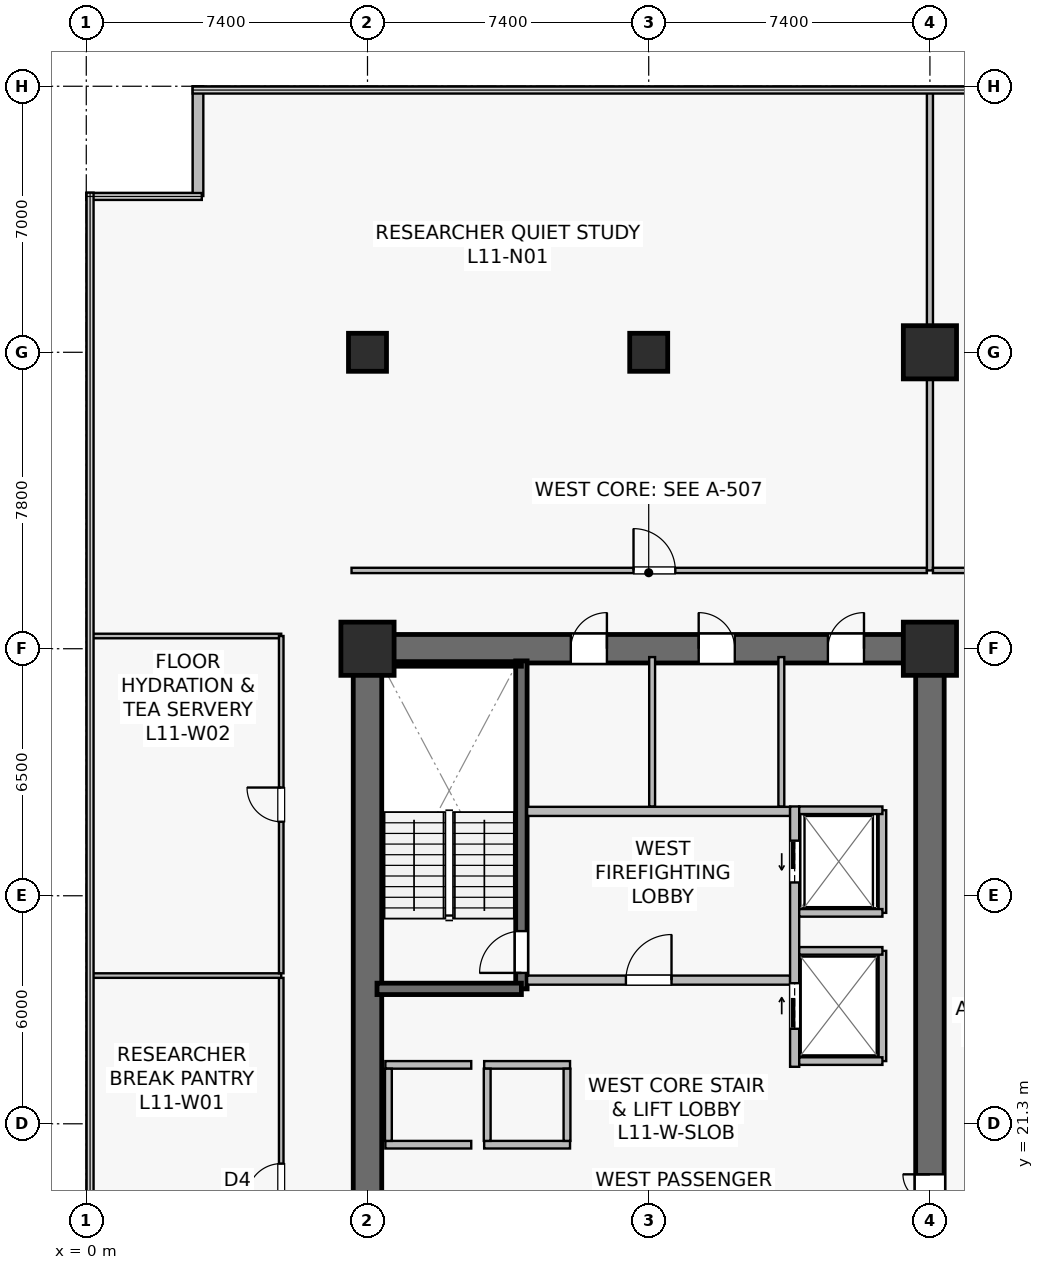
"""IFC4 building model, lengths in metres.
Left out: names, types, materials, properties, quantities, classifications, styles, units other than length and angle.
Written with IfcOpenShell. Run it as: python <this file> out.ifc"""

import sys

from ifc_helpers import new_model, si_unit, direction, frame, frame_2d, origin, origin_2d, place, context, subcontext, project, spatial, rectangle, extrude, source, transform, mapped, element, fill, save


model = new_model("IFC4")
c1 = context("Model", 3, precision=1e-05, world=origin(), true_north=direction((0.0, 1.0)))
c2 = subcontext(c1, "Body", "Model", "MODEL_VIEW")
j1 = project(units=[si_unit("LENGTHUNIT", "METRE"), si_unit("PLANEANGLEUNIT", "RADIAN")], contexts=[c1])
p1 = place(None, origin())
s1 = spatial("IfcSite", under=j1, at=p1, CompositionType="ELEMENT")
p2 = place(p1, origin())
s2 = spatial("IfcBuilding", under=s1, at=p2, CompositionType="ELEMENT")
p3 = place(p2, frame((0.0, 0.0, 45.7)))
s3 = spatial("IfcBuildingStorey", under=s2, at=p3, CompositionType="ELEMENT", Elevation=45.7)
p4 = place(p3, frame((7.025, 33.8, 0.0), z_axis=(0.0, 0.0, 1.0), x_axis=(1.0, 0.0, 0.0)))
e1 = element("IfcWall", 1, at=p4, inside=s3, PredefinedType="SHEAR", context=c2, shape_type="SweptSolid", body=[
    extrude(rectangle(XDim=15.55, YDim=0.75, at=frame_2d((7.775, 0.0))), origin(), (0.0, 0.0, 1.0), 3.78),
])
p5 = place(p4, frame((5.725, 0.0, 0.0)))
e2 = element("IfcOpeningElement", 2, at=p5, cuts=e1, PredefinedType="OPENING", context=c2, shape_type="SweptSolid", body=[
    extrude(rectangle(XDim=0.95, YDim=2.15, at=frame_2d((0.475, 1.075))), frame((0.0, 0.385, 0.0), z_axis=(0.0, -1.0, 0.0), x_axis=(1.0, 0.0, 0.0)), (0.0, 0.0, 1.0), 0.77),
])
p6 = place(p4, frame((9.09, 0.0, 0.0)))
e3 = element("IfcOpeningElement", 3, at=p6, cuts=e1, PredefinedType="OPENING", context=c2, shape_type="SweptSolid", body=[
    extrude(rectangle(XDim=0.95, YDim=2.15, at=frame_2d((0.475, 1.075))), frame((0.0, 0.385, 0.0), z_axis=(0.0, -1.0, 0.0), x_axis=(1.0, 0.0, 0.0)), (0.0, 0.0, 1.0), 0.77),
])
p7 = place(p4, frame((12.49, 0.0, 0.0)))
e4 = element("IfcOpeningElement", 4, at=p7, cuts=e1, PredefinedType="OPENING", context=c2, shape_type="SweptSolid", body=[
    extrude(rectangle(XDim=0.95, YDim=2.15, at=frame_2d((0.475, 1.075))), frame((0.0, 0.385, 0.0), z_axis=(0.0, -1.0, 0.0), x_axis=(1.0, 0.0, 0.0)), (0.0, 0.0, 1.0), 0.77),
])
p8 = place(p3, frame((7.4, 15.175, 0.0), z_axis=(0.0, 0.0, 1.0), x_axis=(0.0, 1.0, 0.0)))
e5 = element("IfcWall", 5, at=p8, inside=s3, PredefinedType="SHEAR", context=c2, shape_type="SweptSolid", body=[
    extrude(rectangle(XDim=18.25, YDim=0.75, at=frame_2d((9.125, 0.0))), origin(), (0.0, 0.0, 1.0), 3.78),
])
p9 = place(p3, frame((22.2, 15.175, 0.0), z_axis=(0.0, 0.0, 1.0), x_axis=(0.0, 1.0, 0.0)))
e6 = element("IfcWall", 6, at=p9, inside=s3, PredefinedType="SHEAR", context=c2, shape_type="SweptSolid", body=[
    extrude(rectangle(XDim=18.25, YDim=0.75, at=frame_2d((9.125, 0.0))), origin(), (0.0, 0.0, 1.0), 3.78),
])
p10 = place(p9, frame((3.375, 0.0, 0.0)))
e7 = element("IfcOpeningElement", 7, at=p10, cuts=e6, PredefinedType="OPENING", context=c2, shape_type="SweptSolid", body=[
    extrude(rectangle(XDim=1.42, YDim=2.2, at=frame_2d((0.71, 1.1))), frame((0.0, 0.385, 0.0), z_axis=(0.0, -1.0, 0.0), x_axis=(1.0, 0.0, 0.0)), (0.0, 0.0, 1.0), 0.77),
])
p11 = place(p3, frame((11.45, 24.85, 0.0), z_axis=(0.0, 0.0, 1.0), x_axis=(0.0, 1.0, 0.0)))
e8 = element("IfcWall", 8, at=p11, inside=s3, PredefinedType="SHEAR", context=c2, shape_type="SweptSolid", body=[
    extrude(rectangle(XDim=8.63, YDim=0.3, at=frame_2d((4.315, 0.0))), origin(), (0.0, 0.0, 1.0), 3.78),
])
p12 = place(p11, frame((0.42, 0.0, 0.0)))
e9 = element("IfcOpeningElement", 9, at=p12, cuts=e8, PredefinedType="OPENING", context=c2, shape_type="SweptSolid", body=[
    extrude(rectangle(XDim=1.1, YDim=2.15, at=frame_2d((0.55, 1.075))), frame((0.0, 0.16, 0.0), z_axis=(0.0, -1.0, 0.0), x_axis=(1.0, 0.0, 0.0)), (0.0, 0.0, 1.0), 0.32),
])
p13 = place(p3, frame((7.65, 24.85, 0.0), z_axis=(0.0, 0.0, 1.0), x_axis=(1.0, 0.0, 0.0)))
e10 = element("IfcWall", 10, at=p13, inside=s3, PredefinedType="SHEAR", context=c2, shape_type="SweptSolid", body=[
    extrude(rectangle(XDim=3.8, YDim=0.3, at=frame_2d((1.9, 0.0))), origin(), (0.0, 0.0, 1.0), 3.78),
])
p14 = place(p3, frame((7.73, 33.4, 0.0), z_axis=(0.0, 0.0, 1.0), x_axis=(1.0, 0.0, 0.0)))
e11 = element("IfcWall", 11, at=p14, inside=s3, PredefinedType="SOLIDWALL", context=c2, shape_type="SweptSolid", body=[
    extrude(rectangle(XDim=3.72, YDim=0.12, at=frame_2d((1.86, 0.0))), origin(), (0.0, 0.0, 1.0), 3.78),
])
m1 = source(origin(), c2, "Body", "SweptSolid", [
    extrude(rectangle(XDim=1.4, YDim=1.4, at=origin_2d()), origin(), (0.0, 0.0, 1.0), 4.1),
])
for number, where, z_axis, x_axis in (
    (12, (7.4, 33.8, 0.0), (0.0, 0.0, 1.0), (1.0, 0.0, 0.0)),
    (13, (22.2, 33.8, 0.0), (0.0, 0.0, 1.0), (1.0, 0.0, 0.0)),
):
    element("IfcColumn", number, at=place(p3, frame(where, z_axis=z_axis, x_axis=x_axis)), inside=s3, PredefinedType="COLUMN", context=c2, shape_type="MappedRepresentation", body=[
        mapped(m1, transform((0.0, 0.0, 0.0), scale=1.0)),
    ])
m2 = source(origin(), c2, "Body", "SweptSolid", [
    extrude(rectangle(XDim=1.0, YDim=1.0, at=origin_2d()), origin(), (0.0, 0.0, 1.0), 4.1),
])
p15 = place(p3, frame((14.8, 41.6, 0.0), z_axis=(0.0, 0.0, 1.0), x_axis=(1.0, 0.0, 0.0)))
e14 = element("IfcColumn", 14, at=p15, inside=s3, PredefinedType="COLUMN", context=c2, shape_type="MappedRepresentation", body=[
    mapped(m2, transform((0.0, 0.0, 0.0), scale=1.0)),
])
p16 = place(p3, frame((22.2, 41.6, 0.0), z_axis=(0.0, 0.0, 1.0), x_axis=(1.0, 0.0, 0.0)))
e15 = element("IfcColumn", 15, at=p16, inside=s3, PredefinedType="COLUMN", context=c2, shape_type="MappedRepresentation", body=[
    mapped(m1, transform((0.0, 0.0, 0.0), scale=1.0)),
])
p17 = place(p3, frame((7.4, 41.6, 0.0), z_axis=(0.0, 0.0, 1.0), x_axis=(1.0, 0.0, 0.0)))
e16 = element("IfcColumn", 16, at=p17, inside=s3, PredefinedType="COLUMN", context=c2, shape_type="MappedRepresentation", body=[
    mapped(m2, transform((0.0, 0.0, 0.0), scale=1.0)),
])
p18 = place(p3, frame((2.94, 48.6, 0.0), z_axis=(0.0, 0.0, 1.0), x_axis=(0.0, -1.0, 0.0)))
e17 = element("IfcWall", 17, at=p18, inside=s3, PredefinedType="STANDARD", context=c2, shape_type="SweptSolid", body=[
    extrude(rectangle(XDim=2.888, YDim=0.28, at=frame_2d((1.444, 0.0))), origin(), (0.0, 0.0, 1.0), 3.78),
])
p19 = place(p3, frame((11.6, 25.08, 0.0), z_axis=(0.0, 0.0, 1.0), x_axis=(1.0, 0.0, 0.0)))
e18 = element("IfcWall", 18, at=p19, inside=s3, PredefinedType="SOLIDWALL", context=c2, shape_type="SweptSolid", body=[
    extrude(rectangle(XDim=6.92, YDim=0.24, at=frame_2d((3.46, 0.0))), origin(), (0.0, 0.0, 1.0), 3.065),
])
p20 = place(p19, frame((2.6, 0.0, 0.0)))
e19 = element("IfcOpeningElement", 19, at=p20, cuts=e18, PredefinedType="OPENING", context=c2, shape_type="SweptSolid", body=[
    extrude(rectangle(XDim=1.2, YDim=2.16, at=frame_2d((0.6, 1.08))), frame((0.0, 0.13, 0.0), z_axis=(0.0, -1.0, 0.0), x_axis=(1.0, 0.0, 0.0)), (0.0, 0.0, 1.0), 0.26),
])
p21 = place(p3, frame((11.6, 29.52, 0.0), z_axis=(0.0, 0.0, 1.0), x_axis=(1.0, 0.0, 0.0)))
e20 = element("IfcWall", 20, at=p21, inside=s3, PredefinedType="SOLIDWALL", context=c2, shape_type="SweptSolid", body=[
    extrude(rectangle(XDim=6.92, YDim=0.24, at=frame_2d((3.46, 0.0))), origin(), (0.0, 0.0, 1.0), 3.065),
])
p22 = place(p3, frame((18.64, 22.8, 0.0), z_axis=(0.0, 0.0, 1.0), x_axis=(0.0, 1.0, 0.0)))
e21 = element("IfcWall", 21, at=p22, inside=s3, PredefinedType="SOLIDWALL", context=c2, shape_type="SweptSolid", body=[
    extrude(rectangle(XDim=6.85, YDim=0.24, at=frame_2d((3.425, 0.0))), origin(), (0.0, 0.0, 1.0), 2.865),
])
p23 = place(p22, frame((4.85, 0.0, 0.0)))
e22 = element("IfcOpeningElement", 22, at=p23, cuts=e21, PredefinedType="OPENING", context=c2, shape_type="SweptSolid", body=[
    extrude(rectangle(XDim=1.1, YDim=2.22, at=frame_2d((0.55, 1.11))), frame((0.0, 0.13, 0.0), z_axis=(0.0, -1.0, 0.0), x_axis=(1.0, 0.0, 0.0)), (0.0, 0.0, 1.0), 0.26),
])
p24 = place(p22, frame((1.0, 0.0, 0.0)))
e23 = element("IfcOpeningElement", 23, at=p24, cuts=e21, PredefinedType="OPENING", context=c2, shape_type="SweptSolid", body=[
    extrude(rectangle(XDim=1.2, YDim=2.22, at=frame_2d((0.6, 1.11))), frame((0.0, 0.13, 0.0), z_axis=(0.0, -1.0, 0.0), x_axis=(1.0, 0.0, 0.0)), (0.0, 0.0, 1.0), 0.26),
])
for number, where, z_axis, x_axis in (
    (24, (7.87, 20.75, 0.0), (0.0, 0.0, 1.0), (1.0, 0.0, 0.0)),
    (25, (7.87, 22.85, 0.0), (0.0, 0.0, 1.0), (1.0, 0.0, 0.0)),
):
    element("IfcWall", number, at=place(p3, frame(where, z_axis=z_axis, x_axis=x_axis)), inside=s3, PredefinedType="SOLIDWALL", context=c2, shape_type="SweptSolid", body=[
        extrude(rectangle(XDim=2.26, YDim=0.2, at=frame_2d((1.13, 0.0))), origin(), (0.0, 0.0, 1.0), 3.78),
    ])
p25 = place(p3, frame((7.95, 20.85, 0.0), z_axis=(0.0, 0.0, 1.0), x_axis=(0.0, 1.0, 0.0)))
e26 = element("IfcWall", 26, at=p25, inside=s3, PredefinedType="SOLIDWALL", context=c2, shape_type="SweptSolid", body=[
    extrude(rectangle(XDim=1.9, YDim=0.18, at=frame_2d((0.95, 0.0))), origin(), (0.0, 0.0, 1.0), 3.78),
])
for number, where, z_axis, x_axis in (
    (27, (10.47, 20.75, 0.0), (0.0, 0.0, 1.0), (1.0, 0.0, 0.0)),
    (28, (10.47, 22.85, 0.0), (0.0, 0.0, 1.0), (1.0, 0.0, 0.0)),
):
    element("IfcWall", number, at=place(p3, frame(where, z_axis=z_axis, x_axis=x_axis)), inside=s3, PredefinedType="SOLIDWALL", context=c2, shape_type="SweptSolid", body=[
        extrude(rectangle(XDim=2.26, YDim=0.2, at=frame_2d((1.13, 0.0))), origin(), (0.0, 0.0, 1.0), 3.78),
    ])
for number, where, z_axis, x_axis in (
    (29, (10.55, 20.85, 0.0), (0.0, 0.0, 1.0), (0.0, 1.0, 0.0)),
    (30, (12.65, 20.85, 0.0), (0.0, 0.0, 1.0), (0.0, 1.0, 0.0)),
):
    element("IfcWall", number, at=place(p3, frame(where, z_axis=z_axis, x_axis=x_axis)), inside=s3, PredefinedType="SOLIDWALL", context=c2, shape_type="SweptSolid", body=[
        extrude(rectangle(XDim=1.9, YDim=0.18, at=frame_2d((0.95, 0.0))), origin(), (0.0, 0.0, 1.0), 3.78),
    ])
p26 = place(p3, frame((20.95, 26.85, 0.0), z_axis=(0.0, 0.0, 1.0), x_axis=(0.0, 1.0, 0.0)))
e31 = element("IfcWall", 31, at=p26, inside=s3, PredefinedType="SOLIDWALL", context=c2, shape_type="SweptSolid", body=[
    extrude(rectangle(XDim=2.7, YDim=0.2, at=frame_2d((1.35, 0.0))), origin(), (0.0, 0.0, 1.0), 3.78),
])
p27 = place(p3, frame((18.76, 29.55, 0.0), z_axis=(0.0, 0.0, 1.0), x_axis=(1.0, 0.0, 0.0)))
e32 = element("IfcWall", 32, at=p27, inside=s3, PredefinedType="SOLIDWALL", context=c2, shape_type="SweptSolid", body=[
    extrude(rectangle(XDim=2.19, YDim=0.2, at=frame_2d((1.095, 0.0))), origin(), (0.0, 0.0, 1.0), 3.78),
])
p28 = place(p3, frame((18.76, 26.85, 0.0), z_axis=(0.0, 0.0, 1.0), x_axis=(1.0, 0.0, 0.0)))
e33 = element("IfcWall", 33, at=p28, inside=s3, PredefinedType="SOLIDWALL", context=c2, shape_type="SweptSolid", body=[
    extrude(rectangle(XDim=2.19, YDim=0.2, at=frame_2d((1.095, 0.0))), origin(), (0.0, 0.0, 1.0), 3.177),
])
p29 = place(p3, frame((20.95, 22.95, 0.0), z_axis=(0.0, 0.0, 1.0), x_axis=(0.0, 1.0, 0.0)))
e34 = element("IfcWall", 34, at=p29, inside=s3, PredefinedType="SOLIDWALL", context=c2, shape_type="SweptSolid", body=[
    extrude(rectangle(XDim=2.9, YDim=0.2, at=frame_2d((1.45, 0.0))), origin(), (0.0, 0.0, 1.0), 2.865),
])
for number, where, z_axis, x_axis in (
    (35, (18.76, 25.85, 0.0), (0.0, 0.0, 1.0), (1.0, 0.0, 0.0)),
    (36, (18.76, 22.95, 0.0), (0.0, 0.0, 1.0), (1.0, 0.0, 0.0)),
):
    element("IfcWall", number, at=place(p3, frame(where, z_axis=z_axis, x_axis=x_axis)), inside=s3, PredefinedType="SOLIDWALL", context=c2, shape_type="SweptSolid", body=[
        extrude(rectangle(XDim=2.19, YDim=0.2, at=frame_2d((1.095, 0.0))), origin(), (0.0, 0.0, 1.0), 3.78),
    ])
p30 = place(p3, frame((14.89, 29.65, 0.0), z_axis=(0.0, 0.0, 1.0), x_axis=(0.0, 1.0, 0.0)))
e37 = element("IfcWall", 37, at=p30, inside=s3, PredefinedType="PLUMBINGWALL", context=c2, shape_type="SweptSolid", body=[
    extrude(rectangle(XDim=3.93, YDim=0.155, at=frame_2d((1.965, 0.0))), origin(), (0.0, 0.0, 1.0), 3.065),
])
p31 = place(p3, frame((18.29, 29.65, 0.0), z_axis=(0.0, 0.0, 1.0), x_axis=(0.0, 1.0, 0.0)))
e38 = element("IfcWall", 38, at=p31, inside=s3, PredefinedType="PLUMBINGWALL", context=c2, shape_type="SweptSolid", body=[
    extrude(rectangle(XDim=3.93, YDim=0.155, at=frame_2d((1.965, 0.0))), origin(), (0.0, 0.0, 1.0), 3.78),
])
p32 = place(p3, frame((6.98, 35.86, 0.0), z_axis=(0.0, 0.0, 1.0), x_axis=(1.0, 0.0, 0.0)))
e39 = element("IfcWall", 39, at=p32, inside=s3, PredefinedType="PARTITIONING", context=c2, shape_type="SweptSolid", body=[
    extrude(rectangle(XDim=15.14, YDim=0.14, at=frame_2d((7.57, 0.0))), origin(), (0.0, 0.0, 1.0), 3.065),
])
p33 = place(p32, frame((7.42, 0.0, 0.0)))
e40 = element("IfcOpeningElement", 40, at=p33, cuts=e39, PredefinedType="OPENING", context=c2, shape_type="SweptSolid", body=[
    extrude(rectangle(XDim=1.1, YDim=2.18, at=frame_2d((0.55, 1.09))), frame((0.0, 0.08, 0.0), z_axis=(0.0, -1.0, 0.0), x_axis=(1.0, 0.0, 0.0)), (0.0, 0.0, 1.0), 0.16),
])
p34 = place(p3, frame((22.2, 35.86, 0.0), z_axis=(0.0, 0.0, 1.0), x_axis=(0.0, 1.0, 0.0)))
e41 = element("IfcWall", 41, at=p34, inside=s3, PredefinedType="PARTITIONING", context=c2, shape_type="SweptSolid", body=[
    extrude(rectangle(XDim=12.63, YDim=0.16, at=frame_2d((6.315, 0.0))), origin(), (0.0, 0.0, 1.0), 3.015),
])
p35 = place(p3, frame((22.28, 35.86, 0.0), z_axis=(0.0, 0.0, 1.0), x_axis=(1.0, 0.0, 0.0)))
e42 = element("IfcWall", 42, at=p35, inside=s3, PredefinedType="PARTITIONING", context=c2, shape_type="SweptSolid", body=[
    extrude(rectangle(XDim=21.44, YDim=0.14, at=frame_2d((10.72, 0.0))), origin(), (0.0, 0.0, 1.0), 3.065),
])
p36 = place(p35, frame((8.402, 0.0, 0.0)))
e43 = element("IfcOpeningElement", 43, at=p36, cuts=e42, PredefinedType="OPENING", context=c2, shape_type="SweptSolid", body=[
    extrude(rectangle(XDim=1.1, YDim=2.18, at=frame_2d((0.55, 1.09))), frame((0.0, 0.08, 0.0), z_axis=(0.0, -1.0, 0.0), x_axis=(1.0, 0.0, 0.0)), (0.0, 0.0, 1.0), 0.16),
])
p37 = place(p3, frame((0.11, 34.135, 0.0), z_axis=(0.0, 0.0, 1.0), x_axis=(1.0, 0.0, 0.0)))
e44 = element("IfcWall", 44, at=p37, inside=s3, PredefinedType="PARTITIONING", context=c2, shape_type="SweptSolid", body=[
    extrude(rectangle(XDim=5.02, YDim=0.12, at=frame_2d((2.51, 0.0))), origin(), (0.0, 0.0, 1.0), 3.78),
])
p38 = place(p3, frame((5.13, 14.465, 0.0), z_axis=(0.0, 0.0, 1.0), x_axis=(0.0, 1.0, 0.0)))
e45 = element("IfcWall", 45, at=p38, inside=s3, PredefinedType="PARTITIONING", context=c2, shape_type="SweptSolid", body=[
    extrude(rectangle(XDim=10.675, YDim=0.12, at=frame_2d((5.337, 0.0))), origin(), (0.0, 0.0, 1.0), 3.78),
])
p39 = place(p38, frame((4.887, 0.0, 0.0)))
e46 = element("IfcOpeningElement", 46, at=p39, cuts=e45, PredefinedType="OPENING", context=c2, shape_type="SweptSolid", body=[
    extrude(rectangle(XDim=0.9, YDim=2.1, at=frame_2d((0.45, 1.05))), frame((0.0, 0.07, 0.0), z_axis=(0.0, -1.0, 0.0), x_axis=(1.0, 0.0, 0.0)), (0.0, 0.0, 1.0), 0.14),
])
p40 = place(p3, frame((0.11, 25.2, 0.0), z_axis=(0.0, 0.0, 1.0), x_axis=(1.0, 0.0, 0.0)))
e47 = element("IfcWall", 47, at=p40, inside=s3, PredefinedType="PARTITIONING", context=c2, shape_type="SweptSolid", body=[
    extrude(rectangle(XDim=5.02, YDim=0.12, at=frame_2d((2.51, 0.0))), origin(), (0.0, 0.0, 1.0), 3.78),
])
p41 = place(p3, frame((5.13, 25.26, 0.0), z_axis=(0.0, 0.0, 1.0), x_axis=(0.0, 1.0, 0.0)))
e48 = element("IfcWall", 48, at=p41, inside=s3, PredefinedType="PARTITIONING", context=c2, shape_type="SweptSolid", body=[
    extrude(rectangle(XDim=8.875, YDim=0.12, at=frame_2d((4.438, 0.0))), origin(), (0.0, 0.0, 1.0), 3.78),
])
p42 = place(p41, frame((3.988, 0.0, 0.0)))
e49 = element("IfcOpeningElement", 49, at=p42, cuts=e48, PredefinedType="OPENING", context=c2, shape_type="SweptSolid", body=[
    extrude(rectangle(XDim=0.9, YDim=2.1, at=frame_2d((0.45, 1.05))), frame((0.0, 0.07, 0.0), z_axis=(0.0, -1.0, 0.0), x_axis=(1.0, 0.0, 0.0)), (0.0, 0.0, 1.0), 0.14),
])
m3 = source(origin(), c2, "Body", "SweptSolid", [
    extrude(rectangle(XDim=1.1, YDim=2.15, at=frame_2d((0.55, 1.075))), frame((0.0, 0.025, 0.0), z_axis=(0.0, -1.0, 0.0), x_axis=(1.0, 0.0, 0.0)), (0.0, 0.0, 1.0), 0.05),
])
p43 = place(p12, origin())
e50 = element("IfcDoor", 50, at=p43, inside=s3, OperationType="SINGLE_SWING_LEFT", PredefinedType="DOOR", context=c2, shape_type="MappedRepresentation", body=[
    mapped(m3, transform((0.0, 0.0, 0.0), scale=1.0)),
])
fill(e9, e50)
m4 = source(origin(), c2, "Body", "SweptSolid", [
    extrude(rectangle(XDim=1.2, YDim=2.16, at=frame_2d((0.6, 1.08))), frame((0.0, 0.025, 0.0), z_axis=(0.0, -1.0, 0.0), x_axis=(1.0, 0.0, 0.0)), (0.0, 0.0, 1.0), 0.05),
])
p44 = place(p20, origin())
e51 = element("IfcDoor", 51, at=p44, inside=s3, OperationType="SINGLE_SWING_RIGHT", PredefinedType="DOOR", context=c2, shape_type="MappedRepresentation", body=[
    mapped(m4, transform((0.0, 0.0, 0.0), scale=1.0)),
])
fill(e19, e51)
m5 = source(origin(), c2, "Body", "SweptSolid", [
    extrude(rectangle(XDim=1.1, YDim=2.22, at=frame_2d((0.55, 1.11))), frame((0.0, 0.025, 0.0), z_axis=(0.0, -1.0, 0.0), x_axis=(1.0, 0.0, 0.0)), (0.0, 0.0, 1.0), 0.05),
])
p45 = place(p23, origin())
e52 = element("IfcDoor", 52, at=p45, inside=s3, OperationType="SLIDING_TO_LEFT", PredefinedType="USERDEFINED", context=c2, shape_type="MappedRepresentation", body=[
    mapped(m5, transform((0.0, 0.0, 0.0), scale=1.0)),
])
fill(e22, e52)
m6 = source(origin(), c2, "Body", "SweptSolid", [
    extrude(rectangle(XDim=1.2, YDim=2.22, at=frame_2d((0.6, 1.11))), frame((0.0, 0.025, 0.0), z_axis=(0.0, -1.0, 0.0), x_axis=(1.0, 0.0, 0.0)), (0.0, 0.0, 1.0), 0.05),
])
p46 = place(p24, origin())
e53 = element("IfcDoor", 53, at=p46, inside=s3, OperationType="SLIDING_TO_RIGHT", PredefinedType="USERDEFINED", context=c2, shape_type="MappedRepresentation", body=[
    mapped(m6, transform((0.0, 0.0, 0.0), scale=1.0)),
])
fill(e23, e53)
m7 = source(origin(), c2, "Body", "SweptSolid", [
    extrude(rectangle(XDim=1.42, YDim=2.2, at=frame_2d((0.71, 1.1))), frame((0.0, 0.025, 0.0), z_axis=(0.0, -1.0, 0.0), x_axis=(1.0, 0.0, 0.0)), (0.0, 0.0, 1.0), 0.05),
])
p47 = place(p10, origin())
e54 = element("IfcDoor", 54, at=p47, inside=s3, OperationType="DOUBLE_DOOR_SINGLE_SWING", PredefinedType="DOOR", context=c2, shape_type="MappedRepresentation", body=[
    mapped(m7, transform((0.0, 0.0, 0.0), scale=1.0)),
])
fill(e7, e54)
m8 = source(origin(), c2, "Body", "SweptSolid", [
    extrude(rectangle(XDim=0.95, YDim=2.15, at=frame_2d((0.475, 1.075))), frame((0.0, 0.025, 0.0), z_axis=(0.0, -1.0, 0.0), x_axis=(1.0, 0.0, 0.0)), (0.0, 0.0, 1.0), 0.05),
])
p48 = place(p5, origin())
e55 = element("IfcDoor", 55, at=p48, inside=s3, OperationType="SINGLE_SWING_RIGHT", PredefinedType="DOOR", context=c2, shape_type="MappedRepresentation", body=[
    mapped(m8, transform((0.0, 0.0, 0.0), scale=1.0)),
])
fill(e2, e55)
p49 = place(p6, origin())
e56 = element("IfcDoor", 56, at=p49, inside=s3, OperationType="SINGLE_SWING_LEFT", PredefinedType="DOOR", context=c2, shape_type="MappedRepresentation", body=[
    mapped(m8, transform((0.0, 0.0, 0.0), scale=1.0)),
])
fill(e3, e56)
p50 = place(p7, origin())
e57 = element("IfcDoor", 57, at=p50, inside=s3, OperationType="SINGLE_SWING_RIGHT", PredefinedType="DOOR", context=c2, shape_type="MappedRepresentation", body=[
    mapped(m8, transform((0.0, 0.0, 0.0), scale=1.0)),
])
fill(e4, e57)
m9 = source(origin(), c2, "Body", "SweptSolid", [
    extrude(rectangle(XDim=1.1, YDim=2.18, at=frame_2d((0.55, 1.09))), frame((0.0, 0.025, 0.0), z_axis=(0.0, -1.0, 0.0), x_axis=(1.0, 0.0, 0.0)), (0.0, 0.0, 1.0), 0.05),
])
p51 = place(p33, origin())
e58 = element("IfcDoor", 58, at=p51, inside=s3, OperationType="SINGLE_SWING_LEFT", PredefinedType="DOOR", context=c2, shape_type="MappedRepresentation", body=[
    mapped(m9, transform((0.0, 0.0, 0.0), scale=1.0)),
])
fill(e40, e58)
m10 = source(origin(), c2, "Body", "SweptSolid", [
    extrude(rectangle(XDim=0.9, YDim=2.1, at=frame_2d((0.45, 1.05))), frame((0.0, 0.025, 0.0), z_axis=(0.0, -1.0, 0.0), x_axis=(1.0, 0.0, 0.0)), (0.0, 0.0, 1.0), 0.05),
])
p52 = place(p39, origin())
e59 = element("IfcDoor", 59, at=p52, inside=s3, OperationType="SINGLE_SWING_LEFT", PredefinedType="DOOR", context=c2, shape_type="MappedRepresentation", body=[
    mapped(m10, transform((0.0, 0.0, 0.0), scale=1.0)),
])
fill(e46, e59)
p53 = place(p42, origin())
e60 = element("IfcDoor", 60, at=p53, inside=s3, OperationType="SINGLE_SWING_RIGHT", PredefinedType="DOOR", context=c2, shape_type="MappedRepresentation", body=[
    mapped(m10, transform((0.0, 0.0, 0.0), scale=1.0)),
])
fill(e49, e60)
save(model, sys.argv[1])
